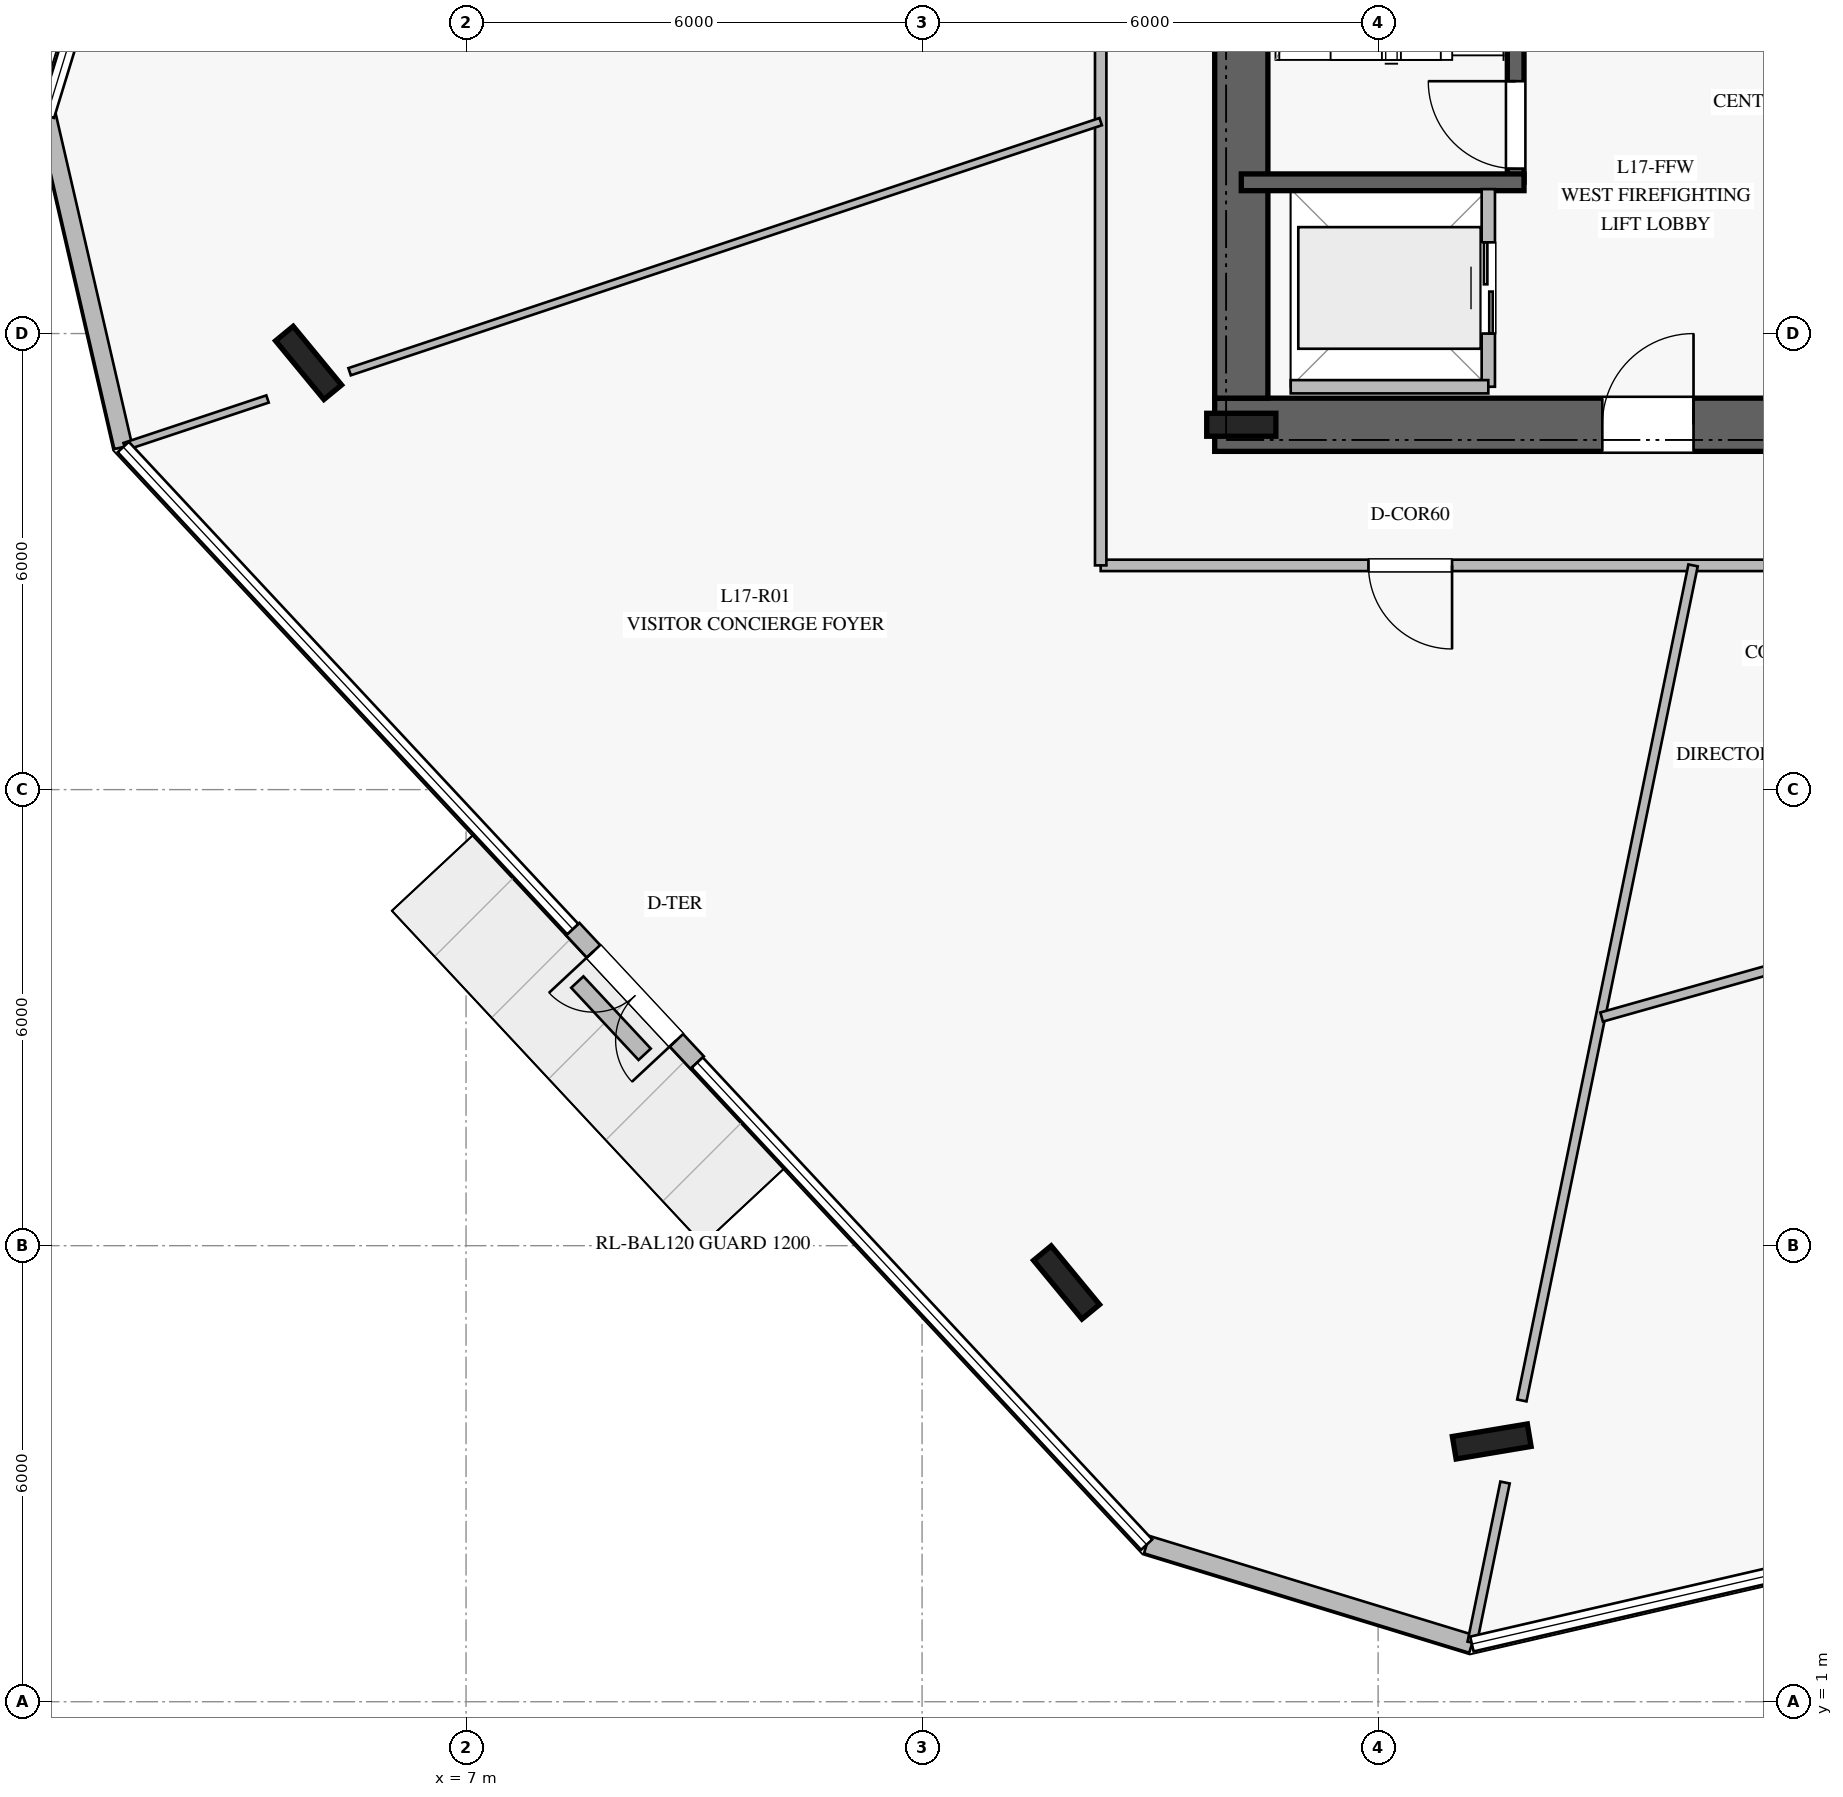
"""IFC4 building model, lengths in metres.
Left out: names, types, materials, properties, quantities, classifications, styles, units other than length and angle.
Written with IfcOpenShell. Run it as: python <this file> out.ifc"""

import sys

from ifc_helpers import new_model, si_unit, direction, frame, frame_2d, origin, origin_2d, place, context, subcontext, project, spatial, rectangle, i_section, extrude, element, fill, save


model = new_model("IFC4")
c1 = context("Model", 3, precision=1e-05, world=origin(), true_north=direction((0.0, 1.0)))
c2 = subcontext(c1, "Body", "Model", "MODEL_VIEW")
j1 = project(units=[si_unit("LENGTHUNIT", "METRE"), si_unit("PLANEANGLEUNIT", "RADIAN")], contexts=[c1])
p1 = place(None, origin())
s1 = spatial("IfcSite", under=j1, at=p1, CompositionType="ELEMENT")
p2 = place(p1, origin())
s2 = spatial("IfcBuilding", under=s1, at=p2, CompositionType="ELEMENT")
p3 = place(p2, frame((0.0, 0.0, 72.0)))
s3 = spatial("IfcBuildingStorey", under=s2, at=p3, CompositionType="ELEMENT", Elevation=72.0)
p4 = place(p3, frame((16.85, 17.8, 0.0), z_axis=(0.0, 0.0, 1.0), x_axis=(1.0, 0.0, 0.0)))
e1 = element("IfcWall", 1, at=p4, inside=s3, PredefinedType="SHEAR", context=c2, shape_type="SweptSolid", body=[
    extrude(rectangle(XDim=16.3, YDim=0.7, at=frame_2d((8.15, 0.0))), origin(), (0.0, 0.0, 1.0), 3.76),
])
p5 = place(p4, frame((5.1, 0.0, 0.0)))
e2 = element("IfcOpeningElement", 2, at=p5, cuts=e1, PredefinedType="OPENING", context=c2, shape_type="SweptSolid", body=[
    extrude(rectangle(XDim=1.2, YDim=2.25, at=frame_2d((0.6, 1.125))), frame((0.0, 0.36, 0.0), z_axis=(0.0, -1.0, 0.0), x_axis=(1.0, 0.0, 0.0)), (0.0, 0.0, 1.0), 0.72),
])
p6 = place(p4, frame((14.05, 0.0, 0.0)))
e3 = element("IfcOpeningElement", 3, at=p6, cuts=e1, PredefinedType="OPENING", context=c2, shape_type="SweptSolid", body=[
    extrude(rectangle(XDim=0.9, YDim=2.1, at=frame_2d((0.45, 1.05))), frame((0.0, 0.36, 0.0), z_axis=(0.0, -1.0, 0.0), x_axis=(1.0, 0.0, 0.0)), (0.0, 0.0, 1.0), 0.72),
])
p7 = place(p4, frame((7.95, 0.0, 0.0)))
e4 = element("IfcOpeningElement", 4, at=p7, cuts=e1, PredefinedType="OPENING", context=c2, shape_type="SweptSolid", body=[
    extrude(rectangle(XDim=1.1, YDim=2.2, at=frame_2d((0.55, 1.1))), frame((0.0, 0.36, 0.0), z_axis=(0.0, -1.0, 0.0), x_axis=(1.0, 0.0, 0.0)), (0.0, 0.0, 1.0), 0.72),
])
p8 = place(p4, frame((9.925, 0.0, 0.0)))
e5 = element("IfcOpeningElement", 5, at=p8, cuts=e1, PredefinedType="OPENING", context=c2, shape_type="SweptSolid", body=[
    extrude(rectangle(XDim=1.1, YDim=2.2, at=frame_2d((0.55, 1.1))), frame((0.0, 0.36, 0.0), z_axis=(0.0, -1.0, 0.0), x_axis=(1.0, 0.0, 0.0)), (0.0, 0.0, 1.0), 0.72),
])
p9 = place(p4, frame((11.9, 0.0, 0.0)))
e6 = element("IfcOpeningElement", 6, at=p9, cuts=e1, PredefinedType="OPENING", context=c2, shape_type="SweptSolid", body=[
    extrude(rectangle(XDim=1.1, YDim=2.2, at=frame_2d((0.55, 1.1))), frame((0.0, 0.36, 0.0), z_axis=(0.0, -1.0, 0.0), x_axis=(1.0, 0.0, 0.0)), (0.0, 0.0, 1.0), 0.72),
])
p10 = place(p3, frame((17.2, 31.85, 0.0), z_axis=(0.0, 0.0, 1.0), x_axis=(0.0, -1.0, 0.0)))
e7 = element("IfcWall", 7, at=p10, inside=s3, PredefinedType="SHEAR", context=c2, shape_type="SweptSolid", body=[
    extrude(rectangle(XDim=13.7, YDim=0.7, at=frame_2d((6.85, 0.0))), origin(), (0.0, 0.0, 1.0), 3.76),
])
p11 = place(p10, frame((2.0, 0.0, 0.0)))
e8 = element("IfcOpeningElement", 8, at=p11, cuts=e7, PredefinedType="OPENING", context=c2, shape_type="SweptSolid", body=[
    extrude(rectangle(XDim=1.5, YDim=2.2, at=frame_2d((0.75, 1.1))), frame((0.0, 0.36, 0.0), z_axis=(0.0, -1.0, 0.0), x_axis=(1.0, 0.0, 0.0)), (0.0, 0.0, 1.0), 0.72),
])
p12 = place(p3, frame((17.2, 17.8, 0.0), z_axis=(0.0, 0.0, 1.0), x_axis=(1.0, 0.0, 0.0)))
e9 = element("IfcColumn", 9, at=p12, inside=s3, PredefinedType="COLUMN", context=c2, shape_type="SweptSolid", body=[
    extrude(i_section(OverallWidth=0.302, OverallDepth=0.91, WebThickness=0.021, FlangeThickness=0.04, at=origin_2d()), origin(), (0.0, 0.0, 1.0), 4.0),
])
p13 = place(p3, frame((20.81, 20.99, 0.0), z_axis=(0.0, 0.0, 1.0), x_axis=(0.0, 1.0, 0.0)))
e10 = element("IfcWall", 10, at=p13, inside=s3, PredefinedType="SOLIDWALL", context=c2, shape_type="SweptSolid", body=[
    extrude(rectangle(XDim=7.22, YDim=0.22, at=frame_2d((3.61, 0.0))), origin(), (0.0, 0.0, 1.0), 3.76),
])
p14 = place(p13, frame((0.18, 0.0, 0.0)))
e11 = element("IfcOpeningElement", 11, at=p14, cuts=e10, PredefinedType="OPENING", context=c2, shape_type="SweptSolid", body=[
    extrude(rectangle(XDim=1.15, YDim=2.2, at=frame_2d((0.575, 1.1))), frame((0.0, 0.12, 0.0), z_axis=(0.0, -1.0, 0.0), x_axis=(1.0, 0.0, 0.0)), (0.0, 0.0, 1.0), 0.24),
])
p15 = place(p3, frame((17.2, 20.99, 0.0), z_axis=(0.0, 0.0, 1.0), x_axis=(1.0, 0.0, 0.0)))
e12 = element("IfcWall", 12, at=p15, inside=s3, PredefinedType="SOLIDWALL", context=c2, shape_type="SweptSolid", body=[
    extrude(rectangle(XDim=3.72, YDim=0.22, at=frame_2d((1.86, 0.0))), origin(), (0.0, 0.0, 1.0), 3.76),
])
for number, where, z_axis, x_axis in (
    (13, (4.928, 18.614, 0.0), (0.0, 0.0, 1.0), (-0.636, 0.772, 0.0)),
    (14, (14.901, 6.516, 0.0), (0.0, 0.0, 1.0), (-0.636, 0.772, 0.0)),
    (15, (20.495, 4.424, 0.0), (0.0, 0.0, 1.0), (0.986, 0.165, 0.0)),
):
    element("IfcColumn", number, at=place(p3, frame(where, z_axis=z_axis, x_axis=x_axis)), inside=s3, PredefinedType="COLUMN", context=c2, shape_type="SweptSolid", body=[
        extrude(i_section(OverallWidth=0.3, OverallDepth=1.0, WebThickness=0.019, FlangeThickness=0.036, at=origin_2d()), origin(), (0.0, 0.0, 1.0), 4.0),
    ])
p16 = place(p3, frame((1.484, 21.866, 0.0), z_axis=(0.0, 0.0, 1.0), x_axis=(0.224903350388, -0.974381076881, 0.0)))
e16 = element("IfcWall", 16, at=p16, inside=s3, PredefinedType="STANDARD", context=c2, shape_type="SweptSolid", body=[
    extrude(rectangle(XDim=4.473, YDim=0.24, at=frame_2d((2.237, 0.0))), origin(), (0.0, 0.0, 1.0), 3.76),
])
p17 = place(p3, frame((8.404, 11.165, 0.0), z_axis=(0.0, 0.0, 1.0), x_axis=(0.681857956093, -0.731484605246, 0.0)))
e17 = element("IfcWall", 17, at=p17, inside=s3, PredefinedType="STANDARD", context=c2, shape_type="SweptSolid", body=[
    extrude(rectangle(XDim=2.401, YDim=0.24, at=frame_2d((1.2, 0.0))), origin(), (0.0, 0.0, 1.0), 3.76),
])
p18 = place(p17, frame((0.4, 0.0, 0.0)))
e18 = element("IfcOpeningElement", 18, at=p18, cuts=e17, PredefinedType="OPENING", context=c2, shape_type="SweptSolid", body=[
    extrude(rectangle(XDim=1.6, YDim=2.25, at=frame_2d((0.8, 1.125))), frame((0.0, 0.13, 0.0), z_axis=(0.0, -1.0, 0.0), x_axis=(1.0, 0.0, 0.0)), (0.0, 0.0, 1.0), 0.26),
])
p19 = place(p3, frame((15.955, 3.067, 0.0), z_axis=(0.0, 0.0, 1.0), x_axis=(0.956323609786, -0.292310029535, 0.0)))
e19 = element("IfcWall", 19, at=p19, inside=s3, PredefinedType="STANDARD", context=c2, shape_type="SweptSolid", body=[
    extrude(rectangle(XDim=4.474, YDim=0.24, at=frame_2d((2.237, 0.0))), origin(), (0.0, 0.0, 1.0), 3.76),
])
p20 = place(p3, frame((8.464, 10.468, 0.0), z_axis=(0.0, 0.0, 1.0), x_axis=(0.682057046315, -0.731298971401, 0.0)))
e20 = element("IfcWall", 20, at=p20, inside=s3, PredefinedType="USERDEFINED", context=c2, shape_type="SweptSolid", body=[
    extrude(rectangle(XDim=1.299, YDim=0.22, at=frame_2d((0.649, 0.0))), origin(), (0.0, 0.0, 1.0), 0.4),
])
p21 = place(p3, frame((20.45, 18.3, 0.0), z_axis=(0.0, 0.0, 1.0), x_axis=(0.0, 1.0, 0.0)))
e21 = element("IfcWall", 21, at=p21, inside=s3, PredefinedType="PARTITIONING", context=c2, shape_type="SweptSolid", body=[
    extrude(rectangle(XDim=2.6, YDim=0.175, at=frame_2d((1.3, 0.0))), origin(), (0.0, 0.0, 1.0), 3.76),
])
p22 = place(p21, frame((0.7, 0.0, 0.0)))
e22 = element("IfcOpeningElement", 22, at=p22, cuts=e21, PredefinedType="OPENING", context=c2, shape_type="SweptSolid", body=[
    extrude(rectangle(XDim=1.2, YDim=2.2, at=frame_2d((0.6, 1.1))), frame((0.0, 0.098, 0.0), z_axis=(0.0, -1.0, 0.0), x_axis=(1.0, 0.0, 0.0)), (0.0, 0.0, 1.0), 0.195),
])
p23 = place(p3, frame((17.85, 18.3, 0.0), z_axis=(0.0, 0.0, 1.0), x_axis=(1.0, 0.0, 0.0)))
e23 = element("IfcWall", 23, at=p23, inside=s3, PredefinedType="PARTITIONING", context=c2, shape_type="SweptSolid", body=[
    extrude(rectangle(XDim=2.6, YDim=0.175, at=frame_2d((1.3, 0.0))), origin(), (0.0, 0.0, 1.0), 3.76),
])
p24 = place(p3, frame((34.65, 15.95, 0.0), z_axis=(0.0, 0.0, 1.0), x_axis=(-1.0, 0.0, 0.0)))
e24 = element("IfcWall", 24, at=p24, inside=s3, PredefinedType="PARTITIONING", context=c2, shape_type="SweptSolid", body=[
    extrude(rectangle(XDim=19.3, YDim=0.15, at=frame_2d((9.65, 0.0))), origin(), (0.0, 0.0, 1.0), 3.21),
])
p25 = place(p24, frame((14.677, 0.0, 0.0)))
e25 = element("IfcOpeningElement", 25, at=p25, cuts=e24, PredefinedType="OPENING", context=c2, shape_type="SweptSolid", body=[
    extrude(rectangle(XDim=1.1, YDim=2.2, at=frame_2d((0.55, 1.1))), frame((0.0, 0.085, 0.0), z_axis=(0.0, -1.0, 0.0), x_axis=(1.0, 0.0, 0.0)), (0.0, 0.0, 1.0), 0.17),
])
p26 = place(p24, frame((6.518, 0.0, 0.0)))
e26 = element("IfcOpeningElement", 26, at=p26, cuts=e24, PredefinedType="OPENING", context=c2, shape_type="SweptSolid", body=[
    extrude(rectangle(XDim=1.1, YDim=2.2, at=frame_2d((0.55, 1.1))), frame((0.0, 0.085, 0.0), z_axis=(0.0, -1.0, 0.0), x_axis=(1.0, 0.0, 0.0)), (0.0, 0.0, 1.0), 0.17),
])
p27 = place(p3, frame((15.35, 15.95, 0.0), z_axis=(0.0, 0.0, 1.0), x_axis=(0.0, 1.0, 0.0)))
e27 = element("IfcWall", 27, at=p27, inside=s3, PredefinedType="PARTITIONING", context=c2, shape_type="SweptSolid", body=[
    extrude(rectangle(XDim=18.1, YDim=0.15, at=frame_2d((9.05, 0.0))), origin(), (0.0, 0.0, 1.0), 3.21),
])
p28 = place(p27, frame((9.678, 0.0, 0.0)))
e28 = element("IfcOpeningElement", 28, at=p28, cuts=e27, PredefinedType="OPENING", context=c2, shape_type="SweptSolid", body=[
    extrude(rectangle(XDim=1.1, YDim=2.2, at=frame_2d((0.55, 1.1))), frame((0.0, 0.085, 0.0), z_axis=(0.0, -1.0, 0.0), x_axis=(1.0, 0.0, 0.0)), (0.0, 0.0, 1.0), 0.17),
])
p29 = place(p3, frame((15.35, 21.788, 0.0), z_axis=(0.0, 0.0, 1.0), x_axis=(-0.948798093557, -0.315883170906, 0.0)))
e29 = element("IfcWall", 29, at=p29, inside=s3, PredefinedType="MOVABLE", context=c2, shape_type="SweptSolid", body=[
    extrude(rectangle(XDim=10.415, YDim=0.1, at=frame_2d((5.208, 0.0))), origin(), (0.0, 0.0, 1.0), 3.21),
])
p30 = place(p3, frame((4.388, 18.139, 0.0), z_axis=(0.0, 0.0, 1.0), x_axis=(-0.948781826694, -0.315932026447, 0.0)))
e30 = element("IfcWall", 30, at=p30, inside=s3, PredefinedType="MOVABLE", context=c2, shape_type="SweptSolid", body=[
    extrude(rectangle(XDim=1.981, YDim=0.1, at=frame_2d((0.991, 0.0))), origin(), (0.0, 0.0, 1.0), 3.76),
])
p31 = place(p3, frame((23.144, 15.95, 0.0), z_axis=(0.0, 0.0, 1.0), x_axis=(-0.200894861911, -0.979612808439, 0.0)))
e31 = element("IfcWall", 31, at=p31, inside=s3, PredefinedType="PARTITIONING", context=c2, shape_type="SweptSolid", body=[
    extrude(rectangle(XDim=11.214, YDim=0.125, at=frame_2d((5.607, 0.0))), origin(), (0.0, 0.0, 1.0), 3.76),
])
p32 = place(p3, frame((20.67, 3.884, 0.0), z_axis=(0.0, 0.0, 1.0), x_axis=(-0.200896639603, -0.979612443876, 0.0)))
e32 = element("IfcWall", 32, at=p32, inside=s3, PredefinedType="PARTITIONING", context=c2, shape_type="SweptSolid", body=[
    extrude(rectangle(XDim=2.15, YDim=0.125, at=frame_2d((1.075, 0.0))), origin(), (0.0, 0.0, 1.0), 3.76),
])
p33 = place(p3, frame((21.941, 10.008, 0.0), z_axis=(0.0, 0.0, 1.0), x_axis=(0.962504966676, 0.271264057928, 0.0)))
e33 = element("IfcWall", 33, at=p33, inside=s3, PredefinedType="PARTITIONING", context=c2, shape_type="SweptSolid", body=[
    extrude(rectangle(XDim=12.449, YDim=0.125, at=frame_2d((6.225, 0.0))), origin(), (0.0, 0.0, 1.0), 3.21),
])
p34 = place(p33, frame((5.724, 0.0, 0.0)))
e34 = element("IfcOpeningElement", 34, at=p34, cuts=e33, PredefinedType="OPENING", context=c2, shape_type="SweptSolid", body=[
    extrude(rectangle(XDim=1.0, YDim=2.15, at=frame_2d((0.5, 1.075))), frame((0.0, 0.073, 0.0), z_axis=(0.0, -1.0, 0.0), x_axis=(1.0, 0.0, 0.0)), (0.0, 0.0, 1.0), 0.145),
])
p35 = place(p18, frame((1.6, 0.0, 0.0), z_axis=(0.0, 0.0, 1.0), x_axis=(-1.0, 0.0, 0.0)))
e35 = element("IfcDoor", 35, at=p35, inside=s3, OperationType="DOUBLE_DOOR_SINGLE_SWING", PredefinedType="DOOR", context=c2, shape_type="SweptSolid", body=[
    extrude(rectangle(XDim=1.6, YDim=2.25, at=frame_2d((0.8, 1.125))), frame((0.0, 0.025, 0.0), z_axis=(0.0, -1.0, 0.0), x_axis=(1.0, 0.0, 0.0)), (0.0, 0.0, 1.0), 0.05),
])
fill(e18, e35)
p36 = place(p14, origin())
e36 = element("IfcDoor", 36, at=p36, inside=s3, OperationType="SINGLE_SWING_RIGHT", PredefinedType="DOOR", context=c2, shape_type="SweptSolid", body=[
    extrude(rectangle(XDim=1.15, YDim=2.2, at=frame_2d((0.575, 1.1))), frame((0.0, 0.025, 0.0), z_axis=(0.0, -1.0, 0.0), x_axis=(1.0, 0.0, 0.0)), (0.0, 0.0, 1.0), 0.05),
])
fill(e11, e36)
p37 = place(p5, origin())
e37 = element("IfcDoor", 37, at=p37, inside=s3, OperationType="SINGLE_SWING_RIGHT", PredefinedType="DOOR", context=c2, shape_type="SweptSolid", body=[
    extrude(rectangle(XDim=1.2, YDim=2.25, at=frame_2d((0.6, 1.125))), frame((0.0, 0.025, 0.0), z_axis=(0.0, -1.0, 0.0), x_axis=(1.0, 0.0, 0.0)), (0.0, 0.0, 1.0), 0.05),
])
fill(e2, e37)
p38 = place(p22, origin())
e38 = element("IfcDoor", 38, at=p38, inside=s3, OperationType="DOUBLE_DOOR_SLIDING", PredefinedType="DOOR", context=c2, shape_type="SweptSolid", body=[
    extrude(rectangle(XDim=1.2, YDim=2.2, at=frame_2d((0.6, 1.1))), frame((0.0, 0.025, 0.0), z_axis=(0.0, -1.0, 0.0), x_axis=(1.0, 0.0, 0.0)), (0.0, 0.0, 1.0), 0.05),
])
fill(e22, e38)
p39 = place(p25, origin())
e39 = element("IfcDoor", 39, at=p39, inside=s3, OperationType="SINGLE_SWING_LEFT", PredefinedType="DOOR", context=c2, shape_type="SweptSolid", body=[
    extrude(rectangle(XDim=1.1, YDim=2.2, at=frame_2d((0.55, 1.1))), frame((0.0, 0.025, 0.0), z_axis=(0.0, -1.0, 0.0), x_axis=(1.0, 0.0, 0.0)), (0.0, 0.0, 1.0), 0.05),
])
fill(e25, e39)
save(model, sys.argv[1])
